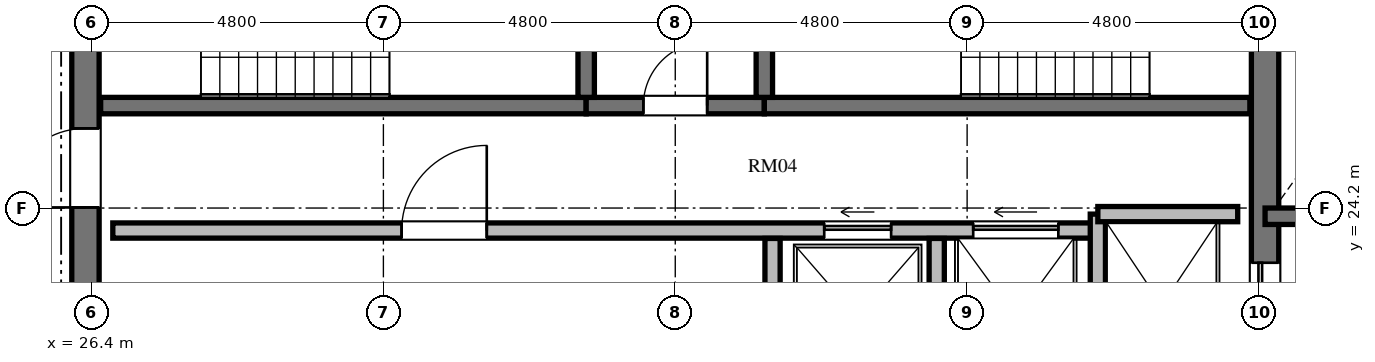
"""IFC4 building model, lengths in metres.
Left out: names, types, materials, properties, quantities, classifications, styles, units other than length and angle.
Written with IfcOpenShell. Run it as: python <this file> out.ifc"""

import sys

from ifc_helpers import new_model, si_unit, direction, frame, frame_2d, origin, place, context, subcontext, project, spatial, rectangle, extrude, element, fill, save


model = new_model("IFC4")
c1 = context("Model", 3, precision=1e-05, world=origin(), true_north=direction((0.0, 1.0)))
c2 = subcontext(c1, "Body", "Model", "MODEL_VIEW")
j1 = project(units=[si_unit("LENGTHUNIT", "METRE"), si_unit("PLANEANGLEUNIT", "RADIAN")], contexts=[c1])
p1 = place(None, origin())
s1 = spatial("IfcSite", under=j1, at=p1, CompositionType="ELEMENT")
p2 = place(p1, origin())
s2 = spatial("IfcBuilding", under=s1, at=p2, CompositionType="ELEMENT")
p3 = place(p2, frame((0.0, 0.0, 255.024)))
s3 = spatial("IfcBuildingStorey", under=s2, at=p3, CompositionType="ELEMENT", Elevation=255.024)
p4 = place(p3, frame((26.3, 20.95, 0.0), z_axis=(0.0, 0.0, 1.0), x_axis=(0.0, 1.0, 0.0)))
e1 = element("IfcWall", 1, at=p4, inside=s3, PredefinedType="SHEAR", context=c2, shape_type="SweptSolid", body=[
    extrude(rectangle(XDim=14.1, YDim=0.45, at=frame_2d((7.05, 0.0))), origin(), (0.0, 0.0, 1.0), 3.648),
])
p5 = place(p4, frame((6.5, 0.0, 0.0)))
e2 = element("IfcOpeningElement", 2, at=p5, cuts=e1, PredefinedType="OPENING", context=c2, shape_type="SweptSolid", body=[
    extrude(rectangle(XDim=1.2, YDim=2.15, at=frame_2d((0.6, 1.075))), frame((0.0, 0.235, 0.0), z_axis=(0.0, -1.0, 0.0), x_axis=(1.0, 0.0, 0.0)), (0.0, 0.0, 1.0), 0.47),
])
p6 = place(p4, frame((9.6, 0.0, 0.0)))
e3 = element("IfcOpeningElement", 3, at=p6, cuts=e1, PredefinedType="OPENING", context=c2, shape_type="SweptSolid", body=[
    extrude(rectangle(XDim=1.3, YDim=2.2, at=frame_2d((0.65, 1.1))), frame((0.0, 0.235, 0.0), z_axis=(0.0, -1.0, 0.0), x_axis=(1.0, 0.0, 0.0)), (0.0, 0.0, 1.0), 0.47),
])
p7 = place(p4, frame((3.26, 0.0, 0.0)))
e4 = element("IfcOpeningElement", 4, at=p7, cuts=e1, PredefinedType="OPENING", context=c2, shape_type="SweptSolid", body=[
    extrude(rectangle(XDim=1.3, YDim=2.2, at=frame_2d((0.65, 1.1))), frame((0.0, 0.235, 0.0), z_axis=(0.0, -1.0, 0.0), x_axis=(1.0, 0.0, 0.0)), (0.0, 0.0, 1.0), 0.47),
])
p8 = place(p3, frame((45.7, 20.95, 0.0), z_axis=(0.0, 0.0, 1.0), x_axis=(0.0, 1.0, 0.0)))
e5 = element("IfcWall", 5, at=p8, inside=s3, PredefinedType="SHEAR", context=c2, shape_type="SweptSolid", body=[
    extrude(rectangle(XDim=14.1, YDim=0.45, at=frame_2d((7.05, 0.0))), origin(), (0.0, 0.0, 1.0), 3.648),
])
p9 = place(p8, frame((11.75, 0.0, 0.0)))
e6 = element("IfcOpeningElement", 6, at=p9, cuts=e5, PredefinedType="OPENING", context=c2, shape_type="SweptSolid", body=[
    extrude(rectangle(XDim=1.4, YDim=2.3, at=frame_2d((0.7, 1.15))), frame((0.0, 0.235, 0.0), z_axis=(0.0, -1.0, 0.0), x_axis=(1.0, 0.0, 0.0)), (0.0, 0.0, 1.0), 0.47),
])
p10 = place(p8, frame((0.95, 0.0, 0.0)))
e7 = element("IfcOpeningElement", 7, at=p10, cuts=e5, PredefinedType="OPENING", context=c2, shape_type="SweptSolid", body=[
    extrude(rectangle(XDim=1.4, YDim=2.3, at=frame_2d((0.7, 1.15))), frame((0.0, 0.235, 0.0), z_axis=(0.0, -1.0, 0.0), x_axis=(1.0, 0.0, 0.0)), (0.0, 0.0, 1.0), 0.47),
])
p11 = place(p3, frame((26.55, 25.885, 0.0), z_axis=(0.0, 0.0, 1.0), x_axis=(1.0, 0.0, 0.0)))
e8 = element("IfcWall", 8, at=p11, inside=s3, PredefinedType="SHEAR", context=c2, shape_type="SweptSolid", body=[
    extrude(rectangle(XDim=7.985, YDim=0.27, at=frame_2d((3.992, 0.0))), origin(), (0.0, 0.0, 1.0), 3.648),
])
p12 = place(p3, frame((34.535, 25.885, 0.0), z_axis=(0.0, 0.0, 1.0), x_axis=(1.0, 0.0, 0.0)))
e9 = element("IfcWall", 9, at=p12, inside=s3, PredefinedType="SHEAR", context=c2, shape_type="SweptSolid", body=[
    extrude(rectangle(XDim=2.93, YDim=0.27, at=frame_2d((1.465, 0.0))), origin(), (0.0, 0.0, 1.0), 3.648),
])
p13 = place(p12, frame((0.94, 0.0, 0.0)))
e10 = element("IfcOpeningElement", 10, at=p13, cuts=e9, PredefinedType="OPENING", context=c2, shape_type="SweptSolid", body=[
    extrude(rectangle(XDim=1.05, YDim=2.15, at=frame_2d((0.525, 1.075))), frame((0.0, 0.145, 0.0), z_axis=(0.0, -1.0, 0.0), x_axis=(1.0, 0.0, 0.0)), (0.0, 0.0, 1.0), 0.29),
])
p14 = place(p3, frame((37.465, 25.885, 0.0), z_axis=(0.0, 0.0, 1.0), x_axis=(1.0, 0.0, 0.0)))
e11 = element("IfcWall", 11, at=p14, inside=s3, PredefinedType="SHEAR", context=c2, shape_type="SweptSolid", body=[
    extrude(rectangle(XDim=7.985, YDim=0.27, at=frame_2d((3.992, 0.0))), origin(), (0.0, 0.0, 1.0), 3.648),
])
for number, where, z_axis, x_axis in (
    (12, (34.535, 26.02, 0.0), (0.0, 0.0, 1.0), (0.0, 1.0, 0.0)),
    (13, (37.465, 26.02, 0.0), (0.0, 0.0, 1.0), (0.0, 1.0, 0.0)),
):
    element("IfcWall", number, at=place(p3, frame(where, z_axis=z_axis, x_axis=x_axis)), inside=s3, PredefinedType="SHEAR", context=c2, shape_type="SweptSolid", body=[
        extrude(rectangle(XDim=4.08, YDim=0.27, at=frame_2d((2.04, 0.0))), origin(), (0.0, 0.0, 1.0), 3.648),
    ])
p15 = place(p3, frame((26.75, 23.83, 0.0), z_axis=(0.0, 0.0, 1.0), x_axis=(1.0, 0.0, 0.0)))
e14 = element("IfcWall", 14, at=p15, inside=s3, PredefinedType="SOLIDWALL", context=c2, shape_type="SweptSolid", body=[
    extrude(rectangle(XDim=16.2, YDim=0.25, at=frame_2d((8.1, 0.0))), origin(), (0.0, 0.0, 1.0), 3.448),
])
p16 = place(p15, frame((4.75, 0.0, 0.0)))
e15 = element("IfcOpeningElement", 15, at=p16, cuts=e14, PredefinedType="OPENING", context=c2, shape_type="SweptSolid", body=[
    extrude(rectangle(XDim=1.4, YDim=2.2, at=frame_2d((0.7, 1.1))), frame((0.0, 0.135, 0.0), z_axis=(0.0, -1.0, 0.0), x_axis=(1.0, 0.0, 0.0)), (0.0, 0.0, 1.0), 0.27),
])
p17 = place(p15, frame((11.7, 0.0, 0.0)))
e16 = element("IfcOpeningElement", 16, at=p17, cuts=e14, PredefinedType="OPENING", context=c2, shape_type="SweptSolid", body=[
    extrude(rectangle(XDim=1.1, YDim=2.2, at=frame_2d((0.55, 1.1))), frame((0.0, 0.135, 0.0), z_axis=(0.0, -1.0, 0.0), x_axis=(1.0, 0.0, 0.0)), (0.0, 0.0, 1.0), 0.27),
])
p18 = place(p15, frame((14.15, 0.0, 0.0)))
e17 = element("IfcOpeningElement", 17, at=p18, cuts=e14, PredefinedType="OPENING", context=c2, shape_type="SweptSolid", body=[
    extrude(rectangle(XDim=1.4, YDim=2.3, at=frame_2d((0.7, 1.15))), frame((0.0, 0.135, 0.0), z_axis=(0.0, -1.0, 0.0), x_axis=(1.0, 0.0, 0.0)), (0.0, 0.0, 1.0), 0.27),
])
p19 = place(p3, frame((42.95, 20.9, 0.0), z_axis=(0.0, 0.0, 1.0), x_axis=(0.0, 1.0, 0.0)))
e18 = element("IfcWall", 18, at=p19, inside=s3, PredefinedType="SOLIDWALL", context=c2, shape_type="SweptSolid", body=[
    extrude(rectangle(XDim=3.2, YDim=0.25, at=frame_2d((1.6, 0.0))), origin(), (0.0, 0.0, 1.0), 3.448),
])
p20 = place(p3, frame((42.95, 24.1, 0.0), z_axis=(0.0, 0.0, 1.0), x_axis=(1.0, 0.0, 0.0)))
e19 = element("IfcWall", 19, at=p20, inside=s3, PredefinedType="SOLIDWALL", context=c2, shape_type="SweptSolid", body=[
    extrude(rectangle(XDim=2.3, YDim=0.25, at=frame_2d((1.15, 0.0))), origin(), (0.0, 0.0, 1.0), 3.448),
])
for number, where, z_axis, x_axis in (
    (20, (37.6, 20.9, 0.0), (0.0, 0.0, 1.0), (0.0, 1.0, 0.0)),
    (21, (40.3, 20.9, 0.0), (0.0, 0.0, 1.0), (0.0, 1.0, 0.0)),
):
    element("IfcWall", number, at=place(p3, frame(where, z_axis=z_axis, x_axis=x_axis)), inside=s3, PredefinedType="SOLIDWALL", context=c2, shape_type="SweptSolid", body=[
        extrude(rectangle(XDim=2.8, YDim=0.25, at=frame_2d((1.4, 0.0))), origin(), (0.0, 0.0, 1.0), 3.448),
    ])
p21 = place(p3, frame((45.7, 24.065, 0.0), z_axis=(0.0, 0.0, 1.0), x_axis=(1.0, 0.0, 0.0)))
e22 = element("IfcWall", 22, at=p21, inside=s3, PredefinedType="SHEAR", context=c2, shape_type="SweptSolid", body=[
    extrude(rectangle(XDim=4.715, YDim=0.27, at=frame_2d((2.357, 0.0))), origin(), (0.0, 0.0, 1.0), 3.648),
])
p22 = place(p13, origin())
e23 = element("IfcDoor", 23, at=p22, inside=s3, OperationType="SINGLE_SWING_RIGHT", PredefinedType="DOOR", context=c2, shape_type="SweptSolid", body=[
    extrude(rectangle(XDim=1.05, YDim=2.15, at=frame_2d((0.525, 1.075))), frame((0.0, 0.025, 0.0), z_axis=(0.0, -1.0, 0.0), x_axis=(1.0, 0.0, 0.0)), (0.0, 0.0, 1.0), 0.05),
])
fill(e10, e23)
p23 = place(p7, origin())
e24 = element("IfcDoor", 24, at=p23, inside=s3, OperationType="SINGLE_SWING_LEFT", PredefinedType="DOOR", context=c2, shape_type="SweptSolid", body=[
    extrude(rectangle(XDim=1.3, YDim=2.2, at=frame_2d((0.65, 1.1))), frame((0.0, 0.025, 0.0), z_axis=(0.0, -1.0, 0.0), x_axis=(1.0, 0.0, 0.0)), (0.0, 0.0, 1.0), 0.05),
])
fill(e4, e24)
p24 = place(p16, origin())
e25 = element("IfcDoor", 25, at=p24, inside=s3, OperationType="SINGLE_SWING_RIGHT", PredefinedType="DOOR", context=c2, shape_type="SweptSolid", body=[
    extrude(rectangle(XDim=1.4, YDim=2.2, at=frame_2d((0.7, 1.1))), frame((0.0, 0.025, 0.0), z_axis=(0.0, -1.0, 0.0), x_axis=(1.0, 0.0, 0.0)), (0.0, 0.0, 1.0), 0.05),
])
fill(e15, e25)
p25 = place(p17, origin())
e26 = element("IfcDoor", 26, at=p25, inside=s3, OperationType="SLIDING_TO_LEFT", PredefinedType="DOOR", context=c2, shape_type="SweptSolid", body=[
    extrude(rectangle(XDim=1.1, YDim=2.2, at=frame_2d((0.55, 1.1))), frame((0.0, 0.025, 0.0), z_axis=(0.0, -1.0, 0.0), x_axis=(1.0, 0.0, 0.0)), (0.0, 0.0, 1.0), 0.05),
])
fill(e16, e26)
p26 = place(p10, origin())
e27 = element("IfcDoor", 27, at=p26, inside=s3, OperationType="SLIDING_TO_LEFT", PredefinedType="DOOR", context=c2, shape_type="SweptSolid", body=[
    extrude(rectangle(XDim=1.4, YDim=2.3, at=frame_2d((0.7, 1.15))), frame((0.0, 0.025, 0.0), z_axis=(0.0, -1.0, 0.0), x_axis=(1.0, 0.0, 0.0)), (0.0, 0.0, 1.0), 0.05),
])
fill(e7, e27)
p27 = place(p18, origin())
e28 = element("IfcDoor", 28, at=p27, inside=s3, OperationType="SLIDING_TO_LEFT", PredefinedType="DOOR", context=c2, shape_type="SweptSolid", body=[
    extrude(rectangle(XDim=1.4, YDim=2.3, at=frame_2d((0.7, 1.15))), frame((0.0, 0.025, 0.0), z_axis=(0.0, -1.0, 0.0), x_axis=(1.0, 0.0, 0.0)), (0.0, 0.0, 1.0), 0.05),
])
fill(e17, e28)
save(model, sys.argv[1])
